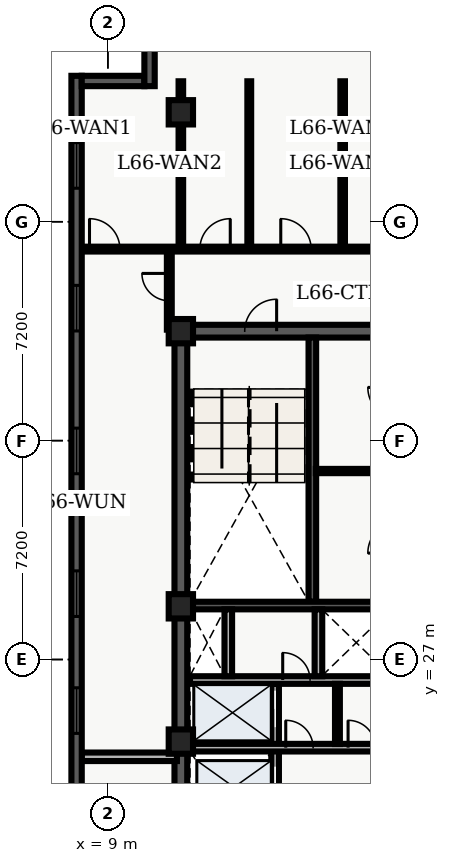
"""IFC4 building model, lengths in metres.
Left out: names, types, materials, properties, quantities, classifications, styles, units other than length and angle.
Written with IfcOpenShell. Run it as: python <this file> out.ifc"""

import sys

from ifc_helpers import new_model, entity, si_unit, converted_unit, direction, frame, origin_with_axes, origin_2d_with_axis, place, context, subcontext, project, spatial, polyline, rectangle, outline, extrude, element, fill, save


model = new_model("IFC4")
c1 = context("Model", 3, precision=1e-05, world=origin_with_axes(), true_north=direction((0.0, 1.0)))
c2 = subcontext(c1, "Body", "Model", "MODEL_VIEW")
j1 = project(units=[si_unit("LENGTHUNIT", "METRE"), converted_unit("PLANEANGLEUNIT", "DEGREE", entity("IfcPlaneAngleMeasure", 0.017), si_unit("PLANEANGLEUNIT", "RADIAN"), dimensions=[0, 0, 0, 0, 0, 0, 0])], contexts=[c1])
p1 = place(None, origin_with_axes())
s1 = spatial("IfcSite", under=j1, at=p1, CompositionType="ELEMENT")
p2 = place(p1, origin_with_axes())
s2 = spatial("IfcBuilding", under=s1, at=p2, CompositionType="ELEMENT")
p3 = place(p2, frame((0.0, 0.0, 268.5), z_axis=(0.0, 0.0, 1.0), x_axis=(1.0, 0.0, 0.0)))
s3 = spatial("IfcBuildingStorey", under=s2, at=p3, CompositionType="ELEMENT", Elevation=268.5)
p4 = place(p3, frame((11.4, 10.8, 0.0), z_axis=(0.0, 0.0, 1.0), x_axis=(0.0, 1.0, 0.0)))
e1 = element("IfcWall", 1, at=p4, inside=s3, PredefinedType="SHEAR", context=c2, shape_type="SweptSolid", body=[
    extrude(outline(polyline([(0.0, -0.21), (27.0, -0.21), (27.0, 0.21), (0.0, 0.21), (0.0, -0.21)])), origin_with_axes(), (0.0, 0.0, 1.0), 3.66),
])
p5 = place(p3, frame((11.4, 37.8, 0.0), z_axis=(0.0, 0.0, 1.0), x_axis=(1.0, 0.0, 0.0)))
e2 = element("IfcWall", 2, at=p5, inside=s3, PredefinedType="SHEAR", context=c2, shape_type="SweptSolid", body=[
    extrude(outline(polyline([(0.0, -0.21), (7.2, -0.21), (7.2, 0.21), (0.0, 0.21), (0.0, -0.21)])), origin_with_axes(), (0.0, 0.0, 1.0), 3.66),
])
p6 = place(p5, frame((2.625, 0.0, 0.0), z_axis=(0.0, 0.0, 1.0), x_axis=(1.0, 0.0, 0.0)))
e3 = element("IfcOpeningElement", 3, at=p6, cuts=e2, PredefinedType="OPENING", context=c2, shape_type="SweptSolid", body=[
    extrude(rectangle(XDim=1.05, YDim=0.44, at=origin_2d_with_axis()), origin_with_axes(), (0.0, 0.0, 1.0), 2.15),
])
p7 = place(p3, frame((15.725, 28.9, 0.0), z_axis=(0.0, 0.0, 1.0), x_axis=(0.0, 1.0, 0.0)))
e4 = element("IfcWall", 4, at=p7, inside=s3, PredefinedType="SHEAR", context=c2, shape_type="SweptSolid", body=[
    extrude(outline(polyline([(0.0, -0.125), (8.69, -0.125), (8.69, 0.125), (0.0, 0.125), (0.0, -0.125)])), origin_with_axes(), (0.0, 0.0, 1.0), 3.66),
])
p8 = place(p3, frame((11.61, 28.775, 0.0), z_axis=(0.0, 0.0, 1.0), x_axis=(1.0, 0.0, 0.0)))
e5 = element("IfcWall", 5, at=p8, inside=s3, PredefinedType="SHEAR", context=c2, shape_type="SweptSolid", body=[
    extrude(outline(polyline([(0.0, -0.125), (6.78, -0.125), (6.78, 0.125), (0.0, 0.125), (0.0, -0.125)])), origin_with_axes(), (0.0, 0.0, 1.0), 3.66),
])
p9 = place(p3, frame((14.5, 19.95, 0.0), z_axis=(0.0, 0.0, 1.0), x_axis=(0.0, 1.0, 0.0)))
e6 = element("IfcWall", 6, at=p9, inside=s3, PredefinedType="SOLIDWALL", context=c2, shape_type="SweptSolid", body=[
    extrude(outline(polyline([(0.0, -0.125), (6.25, -0.125), (6.25, 0.125), (0.0, 0.125), (0.0, -0.125)])), origin_with_axes(), (0.0, 0.0, 1.0), 2.7),
])
p10 = place(p9, frame((1.025, 0.0, 0.0), z_axis=(0.0, 0.0, 1.0), x_axis=(1.0, 0.0, 0.0)))
e7 = element("IfcOpeningElement", 7, at=p10, cuts=e6, PredefinedType="OPENING", context=c2, shape_type="SweptSolid", body=[
    extrude(rectangle(XDim=1.1, YDim=0.27, at=origin_2d_with_axis()), origin_with_axes(), (0.0, 0.0, 1.0), 2.15),
])
p11 = place(p9, frame((2.975, 0.0, 0.0), z_axis=(0.0, 0.0, 1.0), x_axis=(1.0, 0.0, 0.0)))
e8 = element("IfcOpeningElement", 8, at=p11, cuts=e6, PredefinedType="OPENING", context=c2, shape_type="SweptSolid", body=[
    extrude(rectangle(XDim=1.1, YDim=0.27, at=origin_2d_with_axis()), origin_with_axes(), (0.0, 0.0, 1.0), 2.15),
])
p12 = place(p9, frame((5.425, 0.0, 0.0), z_axis=(0.0, 0.0, 1.0), x_axis=(1.0, 0.0, 0.0)))
e9 = element("IfcOpeningElement", 9, at=p12, cuts=e6, PredefinedType="OPENING", context=c2, shape_type="SweptSolid", body=[
    extrude(rectangle(XDim=1.2, YDim=0.27, at=origin_2d_with_axis()), origin_with_axes(), (0.0, 0.0, 1.0), 2.15),
])
p13 = place(p3, frame((11.7, 24.1, 0.0), z_axis=(0.0, 0.0, 1.0), x_axis=(1.0, 0.0, 0.0)))
e10 = element("IfcWall", 10, at=p13, inside=s3, PredefinedType="SOLIDWALL", context=c2, shape_type="SweptSolid", body=[
    extrude(outline(polyline([(0.0, -0.125), (6.6, -0.125), (6.6, 0.125), (0.0, 0.125), (0.0, -0.125)])), origin_with_axes(), (0.0, 0.0, 1.0), 2.7),
])
p14 = place(p13, frame((3.6, 0.0, 0.0), z_axis=(0.0, 0.0, 1.0), x_axis=(1.0, 0.0, 0.0)))
e11 = element("IfcOpeningElement", 11, at=p14, cuts=e10, PredefinedType="OPENING", context=c2, shape_type="SweptSolid", body=[
    extrude(rectangle(XDim=0.9, YDim=0.27, at=origin_2d_with_axis()), origin_with_axes(), (0.0, 0.0, 1.0), 2.15),
])
p15 = place(p13, frame((5.65, 0.0, 0.0), z_axis=(0.0, 0.0, 1.0), x_axis=(1.0, 0.0, 0.0)))
e12 = element("IfcOpeningElement", 12, at=p15, cuts=e10, PredefinedType="OPENING", context=c2, shape_type="SweptSolid", body=[
    extrude(rectangle(XDim=0.9, YDim=0.27, at=origin_2d_with_axis()), origin_with_axes(), (0.0, 0.0, 1.0), 2.15),
])
p16 = place(p3, frame((11.7, 26.325, 0.0), z_axis=(0.0, 0.0, 1.0), x_axis=(1.0, 0.0, 0.0)))
e13 = element("IfcWall", 13, at=p16, inside=s3, PredefinedType="SOLIDWALL", context=c2, shape_type="SweptSolid", body=[
    extrude(outline(polyline([(0.0, -0.125), (6.6, -0.125), (6.6, 0.125), (0.0, 0.125), (0.0, -0.125)])), origin_with_axes(), (0.0, 0.0, 1.0), 2.7),
])
p17 = place(p16, frame((3.5, 0.0, 0.0), z_axis=(0.0, 0.0, 1.0), x_axis=(1.0, 0.0, 0.0)))
e14 = element("IfcOpeningElement", 14, at=p17, cuts=e13, PredefinedType="OPENING", context=c2, shape_type="SweptSolid", body=[
    extrude(rectangle(XDim=0.9, YDim=0.27, at=origin_2d_with_axis()), origin_with_axes(), (0.0, 0.0, 1.0), 2.15),
])
for number, where, z_axis, x_axis in (
    (15, (12.96, 26.45, 0.0), (0.0, 0.0, 1.0), (0.0, 1.0, 0.0)),
    (16, (15.925, 26.45, 0.0), (0.0, 0.0, 1.0), (0.0, 1.0, 0.0)),
):
    element("IfcWall", number, at=place(p3, frame(where, z_axis=z_axis, x_axis=x_axis)), inside=s3, PredefinedType="SOLIDWALL", context=c2, shape_type="SweptSolid", body=[
        extrude(outline(polyline([(0.0, -0.125), (2.2, -0.125), (2.2, 0.125), (0.0, 0.125), (0.0, -0.125)])), origin_with_axes(), (0.0, 0.0, 1.0), 2.7),
    ])
for number, where, z_axis, x_axis in (
    (17, (11.4, 24.3, 0.0), (0.0, 0.0, 1.0), (1.0, 0.0, 0.0)),
    (18, (11.4, 28.75, 0.0), (0.0, 0.0, 1.0), (1.0, 0.0, 0.0)),
    (19, (11.4, 37.8, 0.0), (0.0, 0.0, 1.0), (1.0, 0.0, 0.0)),
    (20, (11.4, 45.0, 0.0), (0.0, 0.0, 1.0), (1.0, 0.0, 0.0)),
):
    element("IfcColumn", number, at=place(p3, frame(where, z_axis=z_axis, x_axis=x_axis)), inside=s3, PredefinedType="COLUMN", context=c2, shape_type="SweptSolid", body=[
        extrude(rectangle(XDim=0.8, YDim=0.8, at=origin_2d_with_axis()), origin_with_axes(), (0.0, 0.0, 1.0), 3.9),
    ])
p18 = place(p3, frame((16.55, 24.22, 0.0), z_axis=(0.0, 0.0, 1.0), x_axis=(0.0, 1.0, 0.0)))
e21 = element("IfcWall", 21, at=p18, inside=s3, PredefinedType="PARTITIONING", context=c2, shape_type="SweptSolid", body=[
    extrude(outline(polyline([(0.0, -0.08), (1.98, -0.08), (1.98, 0.08), (0.0, 0.08), (0.0, -0.08)])), origin_with_axes(), (0.0, 0.0, 1.0), 2.7),
])
p19 = place(p3, frame((15.84, 33.2, 0.0), z_axis=(0.0, 0.0, 1.0), x_axis=(1.0, 0.0, 0.0)))
e22 = element("IfcWall", 22, at=p19, inside=s3, PredefinedType="PARTITIONING", context=c2, shape_type="SweptSolid", body=[
    extrude(outline(polyline([(0.0, -0.07), (2.46, -0.07), (2.46, 0.07), (0.0, 0.07), (0.0, -0.07)])), origin_with_axes(), (0.0, 0.0, 1.0), 2.7),
])
p20 = place(p3, frame((8.135, 40.5, 0.0), z_axis=(0.0, 0.0, 1.0), x_axis=(1.0, 0.0, 0.0)))
e23 = element("IfcWall", 23, at=p20, inside=s3, PredefinedType="PARTITIONING", context=c2, shape_type="SweptSolid", body=[
    extrude(outline(polyline([(0.0, -0.08), (23.93, -0.08), (23.93, 0.08), (0.0, 0.08), (0.0, -0.08)])), origin_with_axes(), (0.0, 0.0, 1.0), 2.7),
])
p21 = place(p20, frame((0.76, 0.0, 0.0), z_axis=(0.0, 0.0, 1.0), x_axis=(1.0, 0.0, 0.0)))
e24 = element("IfcOpeningElement", 24, at=p21, cuts=e23, PredefinedType="OPENING", context=c2, shape_type="SweptSolid", body=[
    extrude(rectangle(XDim=1.0, YDim=0.18, at=origin_2d_with_axis()), origin_with_axes(), (0.0, 0.0, 1.0), 2.15),
])
p22 = place(p20, frame((4.39, 0.0, 0.0), z_axis=(0.0, 0.0, 1.0), x_axis=(1.0, 0.0, 0.0)))
e25 = element("IfcOpeningElement", 25, at=p22, cuts=e23, PredefinedType="OPENING", context=c2, shape_type="SweptSolid", body=[
    extrude(rectangle(XDim=1.0, YDim=0.18, at=origin_2d_with_axis()), origin_with_axes(), (0.0, 0.0, 1.0), 2.15),
])
p23 = place(p20, frame((7.051, 0.0, 0.0), z_axis=(0.0, 0.0, 1.0), x_axis=(1.0, 0.0, 0.0)))
e26 = element("IfcOpeningElement", 26, at=p23, cuts=e23, PredefinedType="OPENING", context=c2, shape_type="SweptSolid", body=[
    extrude(rectangle(XDim=1.0, YDim=0.18, at=origin_2d_with_axis()), origin_with_axes(), (0.0, 0.0, 1.0), 2.15),
])
p24 = place(p20, frame((10.006, 0.0, 0.0), z_axis=(0.0, 0.0, 1.0), x_axis=(1.0, 0.0, 0.0)))
e27 = element("IfcOpeningElement", 27, at=p24, cuts=e23, PredefinedType="OPENING", context=c2, shape_type="SweptSolid", body=[
    extrude(rectangle(XDim=1.0, YDim=0.18, at=origin_2d_with_axis()), origin_with_axes(), (0.0, 0.0, 1.0), 2.15),
])
p25 = place(p3, frame((11.02, 37.85, 0.0), z_axis=(0.0, 0.0, 1.0), x_axis=(0.0, 1.0, 0.0)))
e28 = element("IfcWall", 28, at=p25, inside=s3, PredefinedType="PARTITIONING", context=c2, shape_type="SweptSolid", body=[
    extrude(outline(polyline([(0.0, -0.08), (2.65, -0.08), (2.65, 0.08), (0.0, 0.08), (0.0, -0.08)])), origin_with_axes(), (0.0, 0.0, 1.0), 2.7),
])
p26 = place(p25, frame((1.4, 0.0, 0.0), z_axis=(0.0, 0.0, 1.0), x_axis=(1.0, 0.0, 0.0)))
e29 = element("IfcOpeningElement", 29, at=p26, cuts=e28, PredefinedType="OPENING", context=c2, shape_type="SweptSolid", body=[
    extrude(rectangle(XDim=0.9, YDim=0.18, at=origin_2d_with_axis()), origin_with_axes(), (0.0, 0.0, 1.0), 2.15),
])
p27 = place(p3, frame((8.135, 23.8, 0.0), z_axis=(0.0, 0.0, 1.0), x_axis=(1.0, 0.0, 0.0)))
e30 = element("IfcWall", 30, at=p27, inside=s3, PredefinedType="PARTITIONING", context=c2, shape_type="SweptSolid", body=[
    extrude(outline(polyline([(0.0, -0.14), (3.135, -0.14), (3.135, 0.14), (0.0, 0.14), (0.0, -0.14)])), origin_with_axes(), (0.0, 0.0, 1.0), 2.7),
])
p28 = place(p3, frame((11.4, 40.6, 0.0), z_axis=(0.0, 0.0, 1.0), x_axis=(0.0, 1.0, 0.0)))
e31 = element("IfcWall", 31, at=p28, inside=s3, PredefinedType="PARTITIONING", context=c2, shape_type="SweptSolid", body=[
    extrude(outline(polyline([(0.0, -0.075), (5.42, -0.075), (5.42, 0.075), (0.0, 0.075), (0.0, -0.075)])), origin_with_axes(), (0.0, 0.0, 1.0), 2.7),
])
p29 = place(p3, frame((13.65, 40.6, 0.0), z_axis=(0.0, 0.0, 1.0), x_axis=(0.0, 1.0, 0.0)))
e32 = element("IfcWall", 32, at=p29, inside=s3, PredefinedType="PARTITIONING", context=c2, shape_type="SweptSolid", body=[
    extrude(outline(polyline([(0.0, -0.062), (5.42, -0.062), (5.42, 0.062), (0.0, 0.062), (0.0, -0.062)])), origin_with_axes(), (0.0, 0.0, 1.0), 2.7),
])
p30 = place(p3, frame((16.722, 40.6, 0.0), z_axis=(0.0, 0.0, 1.0), x_axis=(0.0, 1.0, 0.0)))
e33 = element("IfcWall", 33, at=p30, inside=s3, PredefinedType="PARTITIONING", context=c2, shape_type="SweptSolid", body=[
    extrude(outline(polyline([(0.0, -0.075), (5.42, -0.075), (5.42, 0.075), (0.0, 0.075), (0.0, -0.075)])), origin_with_axes(), (0.0, 0.0, 1.0), 2.7),
])
p31 = place(p3, frame((7.97, 2.74, 0.0), z_axis=(0.0, 0.0, 1.0), x_axis=(0.0, 1.0, 0.0)))
e34 = element("IfcWall", 34, at=p31, inside=s3, PredefinedType="SOLIDWALL", context=c2, shape_type="SweptSolid", body=[
    extrude(outline(polyline([(0.0, -0.17), (43.46, -0.17), (43.46, 0.17), (0.0, 0.17), (0.0, -0.17)])), origin_with_axes(), (0.0, 0.0, 1.0), 3.66),
])
p32 = place(p31, frame((2.948, 0.0, 0.45), z_axis=(0.0, 0.0, 1.0), x_axis=(1.0, 0.0, 0.0)))
e35 = element("IfcOpeningElement", 35, at=p32, cuts=e34, PredefinedType="OPENING", context=c2, shape_type="SweptSolid", body=[
    extrude(rectangle(XDim=1.5, YDim=0.36, at=origin_2d_with_axis()), origin_with_axes(), (0.0, 0.0, 1.0), 2.1),
])
p33 = place(p31, frame((7.643, 0.0, 0.45), z_axis=(0.0, 0.0, 1.0), x_axis=(1.0, 0.0, 0.0)))
e36 = element("IfcOpeningElement", 36, at=p33, cuts=e34, PredefinedType="OPENING", context=c2, shape_type="SweptSolid", body=[
    extrude(rectangle(XDim=1.5, YDim=0.36, at=origin_2d_with_axis()), origin_with_axes(), (0.0, 0.0, 1.0), 2.1),
])
p34 = place(p31, frame((12.339, 0.0, 0.45), z_axis=(0.0, 0.0, 1.0), x_axis=(1.0, 0.0, 0.0)))
e37 = element("IfcOpeningElement", 37, at=p34, cuts=e34, PredefinedType="OPENING", context=c2, shape_type="SweptSolid", body=[
    extrude(rectangle(XDim=1.5, YDim=0.36, at=origin_2d_with_axis()), origin_with_axes(), (0.0, 0.0, 1.0), 2.1),
])
p35 = place(p31, frame((17.034, 0.0, 0.45), z_axis=(0.0, 0.0, 1.0), x_axis=(1.0, 0.0, 0.0)))
e38 = element("IfcOpeningElement", 38, at=p35, cuts=e34, PredefinedType="OPENING", context=c2, shape_type="SweptSolid", body=[
    extrude(rectangle(XDim=1.5, YDim=0.36, at=origin_2d_with_axis()), origin_with_axes(), (0.0, 0.0, 1.0), 2.1),
])
p36 = place(p31, frame((22.58, 0.0, 0.45), z_axis=(0.0, 0.0, 1.0), x_axis=(1.0, 0.0, 0.0)))
e39 = element("IfcOpeningElement", 39, at=p36, cuts=e34, PredefinedType="OPENING", context=c2, shape_type="SweptSolid", body=[
    extrude(rectangle(XDim=1.5, YDim=0.36, at=origin_2d_with_axis()), origin_with_axes(), (0.0, 0.0, 1.0), 2.1),
])
p37 = place(p31, frame((26.426, 0.0, 0.45), z_axis=(0.0, 0.0, 1.0), x_axis=(1.0, 0.0, 0.0)))
e40 = element("IfcOpeningElement", 40, at=p37, cuts=e34, PredefinedType="OPENING", context=c2, shape_type="SweptSolid", body=[
    extrude(rectangle(XDim=1.5, YDim=0.36, at=origin_2d_with_axis()), origin_with_axes(), (0.0, 0.0, 1.0), 2.1),
])
p38 = place(p31, frame((31.121, 0.0, 0.45), z_axis=(0.0, 0.0, 1.0), x_axis=(1.0, 0.0, 0.0)))
e41 = element("IfcOpeningElement", 41, at=p38, cuts=e34, PredefinedType="OPENING", context=c2, shape_type="SweptSolid", body=[
    extrude(rectangle(XDim=1.5, YDim=0.36, at=origin_2d_with_axis()), origin_with_axes(), (0.0, 0.0, 1.0), 2.1),
])
p39 = place(p31, frame((35.817, 0.0, 0.45), z_axis=(0.0, 0.0, 1.0), x_axis=(1.0, 0.0, 0.0)))
e42 = element("IfcOpeningElement", 42, at=p39, cuts=e34, PredefinedType="OPENING", context=c2, shape_type="SweptSolid", body=[
    extrude(rectangle(XDim=1.5, YDim=0.36, at=origin_2d_with_axis()), origin_with_axes(), (0.0, 0.0, 1.0), 2.1),
])
p40 = place(p31, frame((40.512, 0.0, 0.45), z_axis=(0.0, 0.0, 1.0), x_axis=(1.0, 0.0, 0.0)))
e43 = element("IfcOpeningElement", 43, at=p40, cuts=e34, PredefinedType="OPENING", context=c2, shape_type="SweptSolid", body=[
    extrude(rectangle(XDim=1.5, YDim=0.36, at=origin_2d_with_axis()), origin_with_axes(), (0.0, 0.0, 1.0), 2.1),
])
p41 = place(p3, frame((8.14, 46.03, 0.0), z_axis=(0.0, 0.0, 1.0), x_axis=(1.0, 0.0, 0.0)))
e44 = element("IfcWall", 44, at=p41, inside=s3, PredefinedType="SOLIDWALL", context=c2, shape_type="SweptSolid", body=[
    extrude(outline(polyline([(0.0, -0.17), (2.06, -0.17), (2.06, 0.17), (0.0, 0.17), (0.0, -0.17)])), origin_with_axes(), (0.0, 0.0, 1.0), 3.66),
])
p42 = place(p3, frame((10.37, 45.86, 0.0), z_axis=(0.0, 0.0, 1.0), x_axis=(0.0, 1.0, 0.0)))
e45 = element("IfcWall", 45, at=p42, inside=s3, PredefinedType="SOLIDWALL", context=c2, shape_type="SweptSolid", body=[
    extrude(outline(polyline([(0.0, -0.17), (2.74, -0.17), (2.74, 0.17), (0.0, 0.17), (0.0, -0.17)])), origin_with_axes(), (0.0, 0.0, 1.0), 3.66),
])
p43 = place(p9, frame((2.975, 0.0, 0.0), z_axis=(0.0, 0.0, 1.0), x_axis=(1.0, 0.0, 0.0)))
e46 = element("IfcDoor", 46, at=p43, inside=s3, OperationType="SLIDING_TO_RIGHT", PredefinedType="DOOR", context=c2, shape_type="SweptSolid", body=[
    extrude(rectangle(XDim=1.1, YDim=0.09, at=origin_2d_with_axis()), origin_with_axes(), (0.0, 0.0, 1.0), 2.15),
])
fill(e8, e46)
p44 = place(p9, frame((5.425, 0.0, 0.0), z_axis=(0.0, 0.0, 1.0), x_axis=(1.0, 0.0, 0.0)))
e47 = element("IfcDoor", 47, at=p44, inside=s3, OperationType="DOUBLE_DOOR_SLIDING", PredefinedType="DOOR", context=c2, shape_type="SweptSolid", body=[
    extrude(rectangle(XDim=1.2, YDim=0.09, at=origin_2d_with_axis()), origin_with_axes(), (0.0, 0.0, 1.0), 2.15),
])
fill(e9, e47)
p45 = place(p5, frame((2.625, 0.0, 0.0), z_axis=(0.0, 0.0, 1.0), x_axis=(1.0, 0.0, 0.0)))
e48 = element("IfcDoor", 48, at=p45, inside=s3, OperationType="SINGLE_SWING_RIGHT", PredefinedType="DOOR", context=c2, shape_type="SweptSolid", body=[
    extrude(rectangle(XDim=1.05, YDim=0.09, at=origin_2d_with_axis()), origin_with_axes(), (0.0, 0.0, 1.0), 2.15),
])
fill(e3, e48)
p46 = place(p13, frame((3.6, 0.0, 0.0), z_axis=(0.0, 0.0, 1.0), x_axis=(1.0, 0.0, 0.0)))
e49 = element("IfcDoor", 49, at=p46, inside=s3, OperationType="SINGLE_SWING_LEFT", PredefinedType="DOOR", context=c2, shape_type="SweptSolid", body=[
    extrude(rectangle(XDim=0.9, YDim=0.09, at=origin_2d_with_axis()), origin_with_axes(), (0.0, 0.0, 1.0), 2.15),
])
fill(e11, e49)
p47 = place(p13, frame((5.65, 0.0, 0.0), z_axis=(0.0, 0.0, 1.0), x_axis=(1.0, 0.0, 0.0)))
e50 = element("IfcDoor", 50, at=p47, inside=s3, OperationType="SINGLE_SWING_LEFT", PredefinedType="DOOR", context=c2, shape_type="SweptSolid", body=[
    extrude(rectangle(XDim=0.9, YDim=0.09, at=origin_2d_with_axis()), origin_with_axes(), (0.0, 0.0, 1.0), 2.15),
])
fill(e12, e50)
p48 = place(p16, frame((3.5, 0.0, 0.0), z_axis=(0.0, 0.0, 1.0), x_axis=(1.0, 0.0, 0.0)))
e51 = element("IfcDoor", 51, at=p48, inside=s3, OperationType="SINGLE_SWING_LEFT", PredefinedType="DOOR", context=c2, shape_type="SweptSolid", body=[
    extrude(rectangle(XDim=0.9, YDim=0.09, at=origin_2d_with_axis()), origin_with_axes(), (0.0, 0.0, 1.0), 2.15),
])
fill(e14, e51)
p49 = place(p25, frame((1.4, 0.0, 0.0), z_axis=(0.0, 0.0, 1.0), x_axis=(1.0, 0.0, 0.0)))
e52 = element("IfcDoor", 52, at=p49, inside=s3, OperationType="SINGLE_SWING_RIGHT", PredefinedType="DOOR", context=c2, shape_type="SweptSolid", body=[
    extrude(rectangle(XDim=0.9, YDim=0.09, at=origin_2d_with_axis()), origin_with_axes(), (0.0, 0.0, 1.0), 2.15),
])
fill(e29, e52)
p50 = place(p20, frame((0.76, 0.0, 0.0), z_axis=(0.0, 0.0, 1.0), x_axis=(1.0, 0.0, 0.0)))
e53 = element("IfcDoor", 53, at=p50, inside=s3, OperationType="SINGLE_SWING_LEFT", PredefinedType="DOOR", context=c2, shape_type="SweptSolid", body=[
    extrude(rectangle(XDim=1.0, YDim=0.09, at=origin_2d_with_axis()), origin_with_axes(), (0.0, 0.0, 1.0), 2.15),
])
fill(e24, e53)
p51 = place(p20, frame((4.39, 0.0, 0.0), z_axis=(0.0, 0.0, 1.0), x_axis=(1.0, 0.0, 0.0)))
e54 = element("IfcDoor", 54, at=p51, inside=s3, OperationType="SINGLE_SWING_RIGHT", PredefinedType="DOOR", context=c2, shape_type="SweptSolid", body=[
    extrude(rectangle(XDim=1.0, YDim=0.09, at=origin_2d_with_axis()), origin_with_axes(), (0.0, 0.0, 1.0), 2.15),
])
fill(e25, e54)
p52 = place(p20, frame((7.051, 0.0, 0.0), z_axis=(0.0, 0.0, 1.0), x_axis=(1.0, 0.0, 0.0)))
e55 = element("IfcDoor", 55, at=p52, inside=s3, OperationType="SINGLE_SWING_LEFT", PredefinedType="DOOR", context=c2, shape_type="SweptSolid", body=[
    extrude(rectangle(XDim=1.0, YDim=0.09, at=origin_2d_with_axis()), origin_with_axes(), (0.0, 0.0, 1.0), 2.15),
])
fill(e26, e55)
p53 = place(p31, frame((22.58, 0.0, 0.45), z_axis=(0.0, 0.0, 1.0), x_axis=(1.0, 0.0, 0.0)))
e56 = element("IfcWindow", 56, at=p53, inside=s3, PredefinedType="WINDOW", context=c2, shape_type="SweptSolid", body=[
    extrude(rectangle(XDim=1.5, YDim=0.09, at=origin_2d_with_axis()), origin_with_axes(), (0.0, 0.0, 1.0), 2.1),
])
fill(e39, e56)
p54 = place(p31, frame((26.426, 0.0, 0.45), z_axis=(0.0, 0.0, 1.0), x_axis=(1.0, 0.0, 0.0)))
e57 = element("IfcWindow", 57, at=p54, inside=s3, PredefinedType="WINDOW", context=c2, shape_type="SweptSolid", body=[
    extrude(rectangle(XDim=1.5, YDim=0.09, at=origin_2d_with_axis()), origin_with_axes(), (0.0, 0.0, 1.0), 2.1),
])
fill(e40, e57)
p55 = place(p31, frame((31.121, 0.0, 0.45), z_axis=(0.0, 0.0, 1.0), x_axis=(1.0, 0.0, 0.0)))
e58 = element("IfcWindow", 58, at=p55, inside=s3, PredefinedType="WINDOW", context=c2, shape_type="SweptSolid", body=[
    extrude(rectangle(XDim=1.5, YDim=0.09, at=origin_2d_with_axis()), origin_with_axes(), (0.0, 0.0, 1.0), 2.1),
])
fill(e41, e58)
p56 = place(p31, frame((35.817, 0.0, 0.45), z_axis=(0.0, 0.0, 1.0), x_axis=(1.0, 0.0, 0.0)))
e59 = element("IfcWindow", 59, at=p56, inside=s3, PredefinedType="WINDOW", context=c2, shape_type="SweptSolid", body=[
    extrude(rectangle(XDim=1.5, YDim=0.09, at=origin_2d_with_axis()), origin_with_axes(), (0.0, 0.0, 1.0), 2.1),
])
fill(e42, e59)
p57 = place(p31, frame((40.512, 0.0, 0.45), z_axis=(0.0, 0.0, 1.0), x_axis=(1.0, 0.0, 0.0)))
e60 = element("IfcWindow", 60, at=p57, inside=s3, PredefinedType="WINDOW", context=c2, shape_type="SweptSolid", body=[
    extrude(rectangle(XDim=1.5, YDim=0.09, at=origin_2d_with_axis()), origin_with_axes(), (0.0, 0.0, 1.0), 2.1),
])
fill(e43, e60)
save(model, sys.argv[1])
